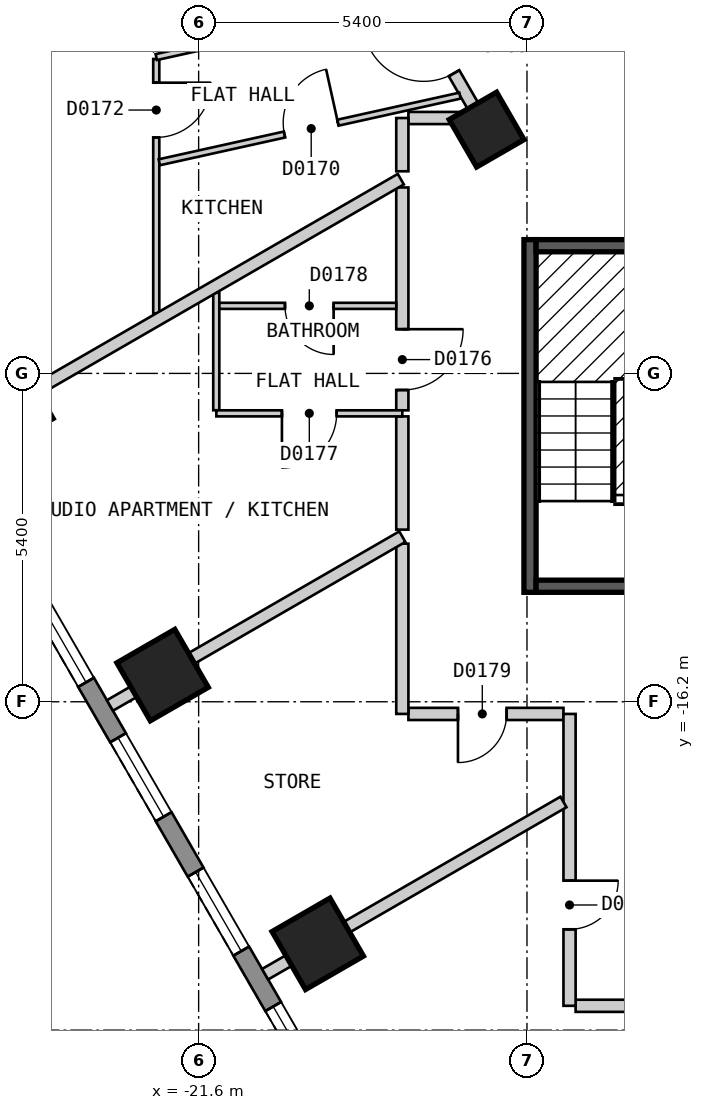
"""IFC4 building model, lengths in metres.
Left out: names, types, materials, properties, quantities, classifications, styles, units other than length and angle.
Written with IfcOpenShell. Run it as: python <this file> out.ifc"""

import sys

from ifc_helpers import new_model, si_unit, direction, frame, frame_2d, origin, origin_2d, place, context, subcontext, project, spatial, polyline, rectangle, outline, extrude, element, fill, save


model = new_model("IFC4")
c1 = context("Model", 3, precision=1e-05, world=origin(), true_north=direction((0.0, 1.0)))
c2 = subcontext(c1, "Body", "Model", "MODEL_VIEW")
j1 = project(units=[si_unit("LENGTHUNIT", "METRE"), si_unit("PLANEANGLEUNIT", "RADIAN")], contexts=[c1])
p1 = place(None, origin())
s1 = spatial("IfcSite", under=j1, at=p1, CompositionType="ELEMENT")
p2 = place(p1, origin())
s2 = spatial("IfcBuilding", under=s1, at=p2, CompositionType="ELEMENT")
p3 = place(p2, frame((0.0, 0.0, 29.4)))
s3 = spatial("IfcBuildingStorey", under=s2, at=p3, CompositionType="ELEMENT", Elevation=29.4)
for number, where, z_axis, x_axis in (
    (1, (-24.745, -11.341, 0.0), (0.0, 0.0, 1.0), (0.5, -0.866, 0.0)),
    (2, (-22.193, -15.761, 0.0), (0.0, 0.0, 1.0), (0.5, -0.866, 0.0)),
    (3, (-19.641, -20.181, 0.0), (0.0, 0.0, 1.0), (0.5, -0.866, 0.0)),
):
    element("IfcColumn", number, at=place(p3, frame(where, z_axis=z_axis, x_axis=x_axis)), inside=s3, PredefinedType="COLUMN", context=c2, shape_type="SweptSolid", body=[
        extrude(rectangle(XDim=1.1, YDim=1.1, at=origin_2d()), origin(), (0.0, 0.0, 1.0), 3.0),
    ])
p4 = place(p3, frame((-16.864, -6.791, 0.0), z_axis=(0.0, 0.0, 1.0), x_axis=(0.499984884929, -0.866034130299, 0.0)))
e4 = element("IfcColumn", 4, at=p4, inside=s3, PredefinedType="COLUMN", context=c2, shape_type="SweptSolid", body=[
    extrude(rectangle(XDim=0.9, YDim=0.9, at=origin_2d()), origin(), (0.0, 0.0, 1.0), 3.0),
])
p5 = place(p3, frame((-31.22, -2.425, 0.0), z_axis=(0.0, 0.0, 1.0), x_axis=(0.500001938803, -0.866024284413, 0.0)))
e5 = element("IfcWall", 5, at=p5, inside=s3, PredefinedType="SOLIDWALL", context=c2, shape_type="SweptSolid", body=[
    extrude(outline(polyline([(0.0, -0.15), (27.02, -0.15), (26.94, 0.15), (0.08, 0.15), (0.0, -0.15)])), origin(), (0.0, 0.0, 1.0), 2.7),
])
p6 = place(p5, frame((1.277, 0.0, 0.15)))
e6 = element("IfcOpeningElement", 6, at=p6, cuts=e5, PredefinedType="OPENING", context=c2, shape_type="SweptSolid", body=[
    extrude(rectangle(XDim=1.5, YDim=2.1, at=frame_2d((0.75, 1.05))), frame((0.0, 0.16, 0.0), z_axis=(0.0, -1.0, 0.0), x_axis=(1.0, 0.0, 0.0)), (0.0, 0.0, 1.0), 0.32),
])
p7 = place(p5, frame((3.829, 0.0, 0.15)))
e7 = element("IfcOpeningElement", 7, at=p7, cuts=e5, PredefinedType="OPENING", context=c2, shape_type="SweptSolid", body=[
    extrude(rectangle(XDim=1.5, YDim=2.1, at=frame_2d((0.75, 1.05))), frame((0.0, 0.16, 0.0), z_axis=(0.0, -1.0, 0.0), x_axis=(1.0, 0.0, 0.0)), (0.0, 0.0, 1.0), 0.32),
])
p8 = place(p5, frame((6.382, 0.0, 0.15)))
e8 = element("IfcOpeningElement", 8, at=p8, cuts=e5, PredefinedType="OPENING", context=c2, shape_type="SweptSolid", body=[
    extrude(rectangle(XDim=1.5, YDim=2.1, at=frame_2d((0.75, 1.05))), frame((0.0, 0.16, 0.0), z_axis=(0.0, -1.0, 0.0), x_axis=(1.0, 0.0, 0.0)), (0.0, 0.0, 1.0), 0.32),
])
p9 = place(p5, frame((8.933, 0.0, 0.15)))
e9 = element("IfcOpeningElement", 9, at=p9, cuts=e5, PredefinedType="OPENING", context=c2, shape_type="SweptSolid", body=[
    extrude(rectangle(XDim=1.5, YDim=2.1, at=frame_2d((0.75, 1.05))), frame((0.0, 0.16, 0.0), z_axis=(0.0, -1.0, 0.0), x_axis=(1.0, 0.0, 0.0)), (0.0, 0.0, 1.0), 0.32),
])
p10 = place(p5, frame((11.485, 0.0, 0.15)))
e10 = element("IfcOpeningElement", 10, at=p10, cuts=e5, PredefinedType="OPENING", context=c2, shape_type="SweptSolid", body=[
    extrude(rectangle(XDim=1.5, YDim=2.1, at=frame_2d((0.75, 1.05))), frame((0.0, 0.16, 0.0), z_axis=(0.0, -1.0, 0.0), x_axis=(1.0, 0.0, 0.0)), (0.0, 0.0, 1.0), 0.32),
])
p11 = place(p5, frame((14.037, 0.0, 0.15)))
e11 = element("IfcOpeningElement", 11, at=p11, cuts=e5, PredefinedType="OPENING", context=c2, shape_type="SweptSolid", body=[
    extrude(rectangle(XDim=1.5, YDim=2.1, at=frame_2d((0.75, 1.05))), frame((0.0, 0.16, 0.0), z_axis=(0.0, -1.0, 0.0), x_axis=(1.0, 0.0, 0.0)), (0.0, 0.0, 1.0), 0.32),
])
p12 = place(p5, frame((16.589, 0.0, 0.15)))
e12 = element("IfcOpeningElement", 12, at=p12, cuts=e5, PredefinedType="OPENING", context=c2, shape_type="SweptSolid", body=[
    extrude(rectangle(XDim=1.5, YDim=2.1, at=frame_2d((0.75, 1.05))), frame((0.0, 0.16, 0.0), z_axis=(0.0, -1.0, 0.0), x_axis=(1.0, 0.0, 0.0)), (0.0, 0.0, 1.0), 0.32),
])
p13 = place(p5, frame((19.141, 0.0, 0.15)))
e13 = element("IfcOpeningElement", 13, at=p13, cuts=e5, PredefinedType="OPENING", context=c2, shape_type="SweptSolid", body=[
    extrude(rectangle(XDim=1.5, YDim=2.1, at=frame_2d((0.75, 1.05))), frame((0.0, 0.16, 0.0), z_axis=(0.0, -1.0, 0.0), x_axis=(1.0, 0.0, 0.0)), (0.0, 0.0, 1.0), 0.32),
])
p14 = place(p5, frame((21.693, 0.0, 0.15)))
e14 = element("IfcOpeningElement", 14, at=p14, cuts=e5, PredefinedType="OPENING", context=c2, shape_type="SweptSolid", body=[
    extrude(rectangle(XDim=1.5, YDim=2.1, at=frame_2d((0.75, 1.05))), frame((0.0, 0.16, 0.0), z_axis=(0.0, -1.0, 0.0), x_axis=(1.0, 0.0, 0.0)), (0.0, 0.0, 1.0), 0.32),
])
p15 = place(p5, frame((24.244, 0.0, 0.15)))
e15 = element("IfcOpeningElement", 15, at=p15, cuts=e5, PredefinedType="OPENING", context=c2, shape_type="SweptSolid", body=[
    extrude(rectangle(XDim=1.5, YDim=2.1, at=frame_2d((0.75, 1.05))), frame((0.0, 0.16, 0.0), z_axis=(0.0, -1.0, 0.0), x_axis=(1.0, 0.0, 0.0)), (0.0, 0.0, 1.0), 0.32),
])
p16 = place(p3, frame((-20.727, -0.101, 0.0), z_axis=(0.0, 0.0, 1.0), x_axis=(0.500065652488, -0.865987495984, 0.0)))
e16 = element("IfcWall", 16, at=p16, inside=s3, PredefinedType="PARTITIONING", context=c2, shape_type="SweptSolid", body=[
    extrude(rectangle(XDim=7.389, YDim=0.2, at=frame_2d((3.695, 0.0))), origin(), (0.0, 0.0, 1.0), 2.7),
])
p17 = place(p16, frame((5.654, 0.0, 0.0)))
e17 = element("IfcOpeningElement", 17, at=p17, cuts=e16, PredefinedType="OPENING", context=c2, shape_type="SweptSolid", body=[
    extrude(rectangle(XDim=1.0, YDim=2.1, at=frame_2d((0.5, 1.05))), frame((0.0, 0.11, 0.0), z_axis=(0.0, -1.0, 0.0), x_axis=(1.0, 0.0, 0.0)), (0.0, 0.0, 1.0), 0.22),
])
p18 = place(p3, frame((-18.25, -11.507, 0.0), z_axis=(0.0, 0.0, 1.0), x_axis=(0.0, -1.0, 0.0)))
e18 = element("IfcWall", 18, at=p18, inside=s3, PredefinedType="PARTITIONING", context=c2, shape_type="SweptSolid", body=[
    extrude(rectangle(XDim=1.862, YDim=0.2, at=frame_2d((0.931, 0.0))), origin(), (0.0, 0.0, 1.0), 2.7),
])
p19 = place(p3, frame((-18.15, -6.6, 0.0), z_axis=(0.0, 0.0, 1.0), x_axis=(1.0, 0.0, 0.0)))
e19 = element("IfcWall", 19, at=p19, inside=s3, PredefinedType="PARTITIONING", context=c2, shape_type="SweptSolid", body=[
    extrude(rectangle(XDim=1.176, YDim=0.2, at=frame_2d((0.588, 0.0))), origin(), (0.0, 0.0, 1.0), 2.7),
])
p20 = place(p3, frame((-18.15, -16.4, 0.0), z_axis=(0.0, 0.0, 1.0), x_axis=(1.0, 0.0, 0.0)))
e20 = element("IfcWall", 20, at=p20, inside=s3, PredefinedType="PARTITIONING", context=c2, shape_type="SweptSolid", body=[
    extrude(rectangle(XDim=2.55, YDim=0.2, at=frame_2d((1.275, 0.0))), origin(), (0.0, 0.0, 1.0), 2.7),
])
p21 = place(p20, frame((0.815, 0.0, 0.0)))
e21 = element("IfcOpeningElement", 21, at=p21, cuts=e20, PredefinedType="OPENING", context=c2, shape_type="SweptSolid", body=[
    extrude(rectangle(XDim=0.8, YDim=2.1, at=frame_2d((0.4, 1.05))), frame((0.0, 0.11, 0.0), z_axis=(0.0, -1.0, 0.0), x_axis=(1.0, 0.0, 0.0)), (0.0, 0.0, 1.0), 0.22),
])
p22 = place(p3, frame((-15.4, -21.2, 0.0), z_axis=(0.0, 0.0, 1.0), x_axis=(1.0, 0.0, 0.0)))
e22 = element("IfcWall", 22, at=p22, inside=s3, PredefinedType="PARTITIONING", context=c2, shape_type="SweptSolid", body=[
    extrude(rectangle(XDim=30.799, YDim=0.2, at=frame_2d((15.399, 0.0))), origin(), (0.0, 0.0, 1.0), 2.7),
])
p23 = place(p22, frame((4.985, 0.0, 0.0)))
e23 = element("IfcOpeningElement", 23, at=p23, cuts=e22, PredefinedType="OPENING", context=c2, shape_type="SweptSolid", body=[
    extrude(rectangle(XDim=0.9, YDim=2.1, at=frame_2d((0.45, 1.05))), frame((0.0, 0.11, 0.0), z_axis=(0.0, -1.0, 0.0), x_axis=(1.0, 0.0, 0.0)), (0.0, 0.0, 1.0), 0.22),
])
p24 = place(p22, frame((14.901, 0.0, 0.0)))
e24 = element("IfcOpeningElement", 24, at=p24, cuts=e22, PredefinedType="OPENING", context=c2, shape_type="SweptSolid", body=[
    extrude(rectangle(XDim=1.0, YDim=2.1, at=frame_2d((0.5, 1.05))), frame((0.0, 0.11, 0.0), z_axis=(0.0, -1.0, 0.0), x_axis=(1.0, 0.0, 0.0)), (0.0, 0.0, 1.0), 0.22),
])
p25 = place(p22, frame((20.005, 0.0, 0.0)))
e25 = element("IfcOpeningElement", 25, at=p25, cuts=e22, PredefinedType="OPENING", context=c2, shape_type="SweptSolid", body=[
    extrude(rectangle(XDim=1.0, YDim=2.1, at=frame_2d((0.5, 1.05))), frame((0.0, 0.11, 0.0), z_axis=(0.0, -1.0, 0.0), x_axis=(1.0, 0.0, 0.0)), (0.0, 0.0, 1.0), 0.22),
])
p26 = place(p22, frame((24.916, 0.0, 0.0)))
e26 = element("IfcOpeningElement", 26, at=p26, cuts=e22, PredefinedType="OPENING", context=c2, shape_type="SweptSolid", body=[
    extrude(rectangle(XDim=0.9, YDim=2.1, at=frame_2d((0.45, 1.05))), frame((0.0, 0.11, 0.0), z_axis=(0.0, -1.0, 0.0), x_axis=(1.0, 0.0, 0.0)), (0.0, 0.0, 1.0), 0.22),
])
p27 = place(p3, frame((-15.5, -21.2, 0.0), z_axis=(0.0, 0.0, 1.0), x_axis=(0.0, 1.0, 0.0)))
e27 = element("IfcWall", 27, at=p27, inside=s3, PredefinedType="PARTITIONING", context=c2, shape_type="SweptSolid", body=[
    extrude(rectangle(XDim=4.8, YDim=0.2, at=frame_2d((2.4, 0.0))), origin(), (0.0, 0.0, 1.0), 2.7),
])
p28 = place(p27, frame((1.258, 0.0, 0.0)))
e28 = element("IfcOpeningElement", 28, at=p28, cuts=e27, PredefinedType="OPENING", context=c2, shape_type="SweptSolid", body=[
    extrude(rectangle(XDim=0.8, YDim=2.1, at=frame_2d((0.4, 1.05))), frame((0.0, 0.11, 0.0), z_axis=(0.0, -1.0, 0.0), x_axis=(1.0, 0.0, 0.0)), (0.0, 0.0, 1.0), 0.22),
])
p29 = place(p3, frame((-18.25, -16.4, 0.0), z_axis=(0.0, 0.0, 1.0), x_axis=(0.0, 1.0, 0.0)))
e29 = element("IfcWall", 29, at=p29, inside=s3, PredefinedType="PARTITIONING", context=c2, shape_type="SweptSolid", body=[
    extrude(rectangle(XDim=2.8, YDim=0.2, at=frame_2d((1.4, 0.0))), origin(), (0.0, 0.0, 1.0), 2.7),
])
p30 = place(p3, frame((-18.25, -11.407, 0.0), z_axis=(0.0, 0.0, 1.0), x_axis=(0.0, 1.0, 0.0)))
e30 = element("IfcWall", 30, at=p30, inside=s3, PredefinedType="PARTITIONING", context=c2, shape_type="SweptSolid", body=[
    extrude(rectangle(XDim=3.665, YDim=0.2, at=frame_2d((1.833, 0.0))), origin(), (0.0, 0.0, 1.0), 2.7),
])
p31 = place(p30, frame((0.334, 0.0, 0.0)))
e31 = element("IfcOpeningElement", 31, at=p31, cuts=e30, PredefinedType="OPENING", context=c2, shape_type="SweptSolid", body=[
    extrude(rectangle(XDim=1.0, YDim=2.1, at=frame_2d((0.5, 1.05))), frame((0.0, 0.11, 0.0), z_axis=(0.0, -1.0, 0.0), x_axis=(1.0, 0.0, 0.0)), (0.0, 0.0, 1.0), 0.22),
])
p32 = place(p3, frame((-18.25, -7.476, 0.0), z_axis=(0.0, 0.0, 1.0), x_axis=(0.0, 1.0, 0.0)))
e32 = element("IfcWall", 32, at=p32, inside=s3, PredefinedType="PARTITIONING", context=c2, shape_type="SweptSolid", body=[
    extrude(rectangle(XDim=0.876, YDim=0.2, at=frame_2d((0.438, 0.0))), origin(), (0.0, 0.0, 1.0), 2.7),
])
p33 = place(p3, frame((-21.31, -9.474, 0.0), z_axis=(0.0, 0.0, 1.0), x_axis=(0.0, -1.0, 0.0)))
e33 = element("IfcWall", 33, at=p33, inside=s3, PredefinedType="PARTITIONING", context=c2, shape_type="SweptSolid", body=[
    extrude(rectangle(XDim=1.932, YDim=0.1, at=frame_2d((0.966, 0.0))), origin(), (0.0, 0.0, 1.0), 2.7),
])
p34 = place(p3, frame((-21.26, -9.689, 0.0), z_axis=(0.0, 0.0, 1.0), x_axis=(1.0, 0.0, 0.0)))
e34 = element("IfcWall", 34, at=p34, inside=s3, PredefinedType="PARTITIONING", context=c2, shape_type="SweptSolid", body=[
    extrude(rectangle(XDim=2.91, YDim=0.1, at=frame_2d((1.455, 0.0))), origin(), (0.0, 0.0, 1.0), 2.7),
])
p35 = place(p34, frame((1.08, 0.0, 0.0)))
e35 = element("IfcOpeningElement", 35, at=p35, cuts=e34, PredefinedType="OPENING", context=c2, shape_type="SweptSolid", body=[
    extrude(rectangle(XDim=0.8, YDim=2.1, at=frame_2d((0.4, 1.05))), frame((0.0, 0.06, 0.0), z_axis=(0.0, -1.0, 0.0), x_axis=(1.0, 0.0, 0.0)), (0.0, 0.0, 1.0), 0.12),
])
p36 = place(p3, frame((-21.309, -11.457, 0.0), z_axis=(0.0, 0.0, 1.0), x_axis=(1.0, 0.0, 0.0)))
e36 = element("IfcWall", 36, at=p36, inside=s3, PredefinedType="PARTITIONING", context=c2, shape_type="SweptSolid", body=[
    extrude(rectangle(XDim=3.059, YDim=0.1, at=frame_2d((1.53, 0.0))), origin(), (0.0, 0.0, 1.0), 2.7),
])
p37 = place(p36, frame((1.079, 0.0, 0.0)))
e37 = element("IfcOpeningElement", 37, at=p37, cuts=e36, PredefinedType="OPENING", context=c2, shape_type="SweptSolid", body=[
    extrude(rectangle(XDim=0.9, YDim=2.1, at=frame_2d((0.45, 1.05))), frame((0.0, 0.06, 0.0), z_axis=(0.0, -1.0, 0.0), x_axis=(1.0, 0.0, 0.0)), (0.0, 0.0, 1.0), 0.12),
])
p38 = place(p3, frame((-22.297, -9.813, 0.0), z_axis=(0.0, 0.0, 1.0), x_axis=(0.0, 1.0, 0.0)))
e38 = element("IfcWall", 38, at=p38, inside=s3, PredefinedType="PARTITIONING", context=c2, shape_type="SweptSolid", body=[
    extrude(rectangle(XDim=4.184, YDim=0.1, at=frame_2d((2.092, 0.0))), origin(), (0.0, 0.0, 1.0), 2.7),
])
p39 = place(p38, frame((2.894, 0.0, 0.0)))
e39 = element("IfcOpeningElement", 39, at=p39, cuts=e38, PredefinedType="OPENING", context=c2, shape_type="SweptSolid", body=[
    extrude(rectangle(XDim=0.9, YDim=2.1, at=frame_2d((0.45, 1.05))), frame((0.0, 0.06, 0.0), z_axis=(0.0, -1.0, 0.0), x_axis=(1.0, 0.0, 0.0)), (0.0, 0.0, 1.0), 0.12),
])
p40 = place(p3, frame((-22.297, -5.598, 0.0), z_axis=(0.0, 0.0, 1.0), x_axis=(0.976341239907, 0.216235481033, 0.0)))
e40 = element("IfcWall", 40, at=p40, inside=s3, PredefinedType="PARTITIONING", context=c2, shape_type="SweptSolid", body=[
    extrude(rectangle(XDim=4.203, YDim=0.1, at=frame_2d((2.102, 0.0))), origin(), (0.0, 0.0, 1.0), 2.7),
])
p41 = place(p40, frame((1.754, 0.0, 0.0)))
e41 = element("IfcOpeningElement", 41, at=p41, cuts=e40, PredefinedType="OPENING", context=c2, shape_type="SweptSolid", body=[
    extrude(rectangle(XDim=0.8, YDim=2.1, at=frame_2d((0.4, 1.05))), frame((0.0, 0.06, 0.0), z_axis=(0.0, -1.0, 0.0), x_axis=(1.0, 0.0, 0.0)), (0.0, 0.0, 1.0), 0.12),
])
p42 = place(p3, frame((-22.247, -7.328, 0.0), z_axis=(0.0, 0.0, 1.0), x_axis=(0.976310522972, 0.216374126765, 0.0)))
e42 = element("IfcWall", 42, at=p42, inside=s3, PredefinedType="PARTITIONING", context=c2, shape_type="SweptSolid", body=[
    extrude(rectangle(XDim=5.065, YDim=0.1, at=frame_2d((2.532, 0.0))), origin(), (0.0, 0.0, 1.0), 2.7),
])
p43 = place(p42, frame((2.109, 0.0, 0.0)))
e43 = element("IfcOpeningElement", 43, at=p43, cuts=e42, PredefinedType="OPENING", context=c2, shape_type="SweptSolid", body=[
    extrude(rectangle(XDim=0.9, YDim=2.1, at=frame_2d((0.45, 1.05))), frame((0.0, 0.06, 0.0), z_axis=(0.0, -1.0, 0.0), x_axis=(1.0, 0.0, 0.0)), (0.0, 0.0, 1.0), 0.12),
])
p44 = place(p3, frame((-28.163, -7.42, 0.0), z_axis=(0.0, 0.0, 1.0), x_axis=(0.866065245018, 0.499930986609, 0.0)))
e44 = element("IfcWall", 44, at=p44, inside=s3, PredefinedType="PARTITIONING", context=c2, shape_type="SweptSolid", body=[
    extrude(rectangle(XDim=10.0, YDim=0.1, at=frame_2d((5.0, 0.0))), origin(), (0.0, 0.0, 1.0), 2.7),
])
p45 = place(p44, frame((2.576, 0.0, 0.0)))
e45 = element("IfcOpeningElement", 45, at=p45, cuts=e44, PredefinedType="OPENING", context=c2, shape_type="SweptSolid", body=[
    extrude(rectangle(XDim=0.9, YDim=2.1, at=frame_2d((0.45, 1.05))), frame((0.0, 0.06, 0.0), z_axis=(0.0, -1.0, 0.0), x_axis=(1.0, 0.0, 0.0)), (0.0, 0.0, 1.0), 0.12),
])
p46 = place(p3, frame((-20.507, -20.681, 0.0), z_axis=(0.0, 0.0, 1.0), x_axis=(0.866028446103, 0.499994730513, 0.0)))
e46 = element("IfcWall", 46, at=p46, inside=s3, PredefinedType="PARTITIONING", context=c2, shape_type="SweptSolid", body=[
    extrude(rectangle(XDim=5.666, YDim=0.2, at=frame_2d((2.833, 0.0))), origin(), (0.0, 0.0, 1.0), 2.7),
])
p47 = place(p3, frame((-23.059, -16.261, 0.0), z_axis=(0.0, 0.0, 1.0), x_axis=(0.866075767886, 0.499912756669, 0.0)))
e47 = element("IfcWall", 47, at=p47, inside=s3, PredefinedType="PARTITIONING", context=c2, shape_type="SweptSolid", body=[
    extrude(rectangle(XDim=5.553, YDim=0.2, at=frame_2d((2.776, 0.0))), origin(), (0.0, 0.0, 1.0), 2.7),
])
p48 = place(p3, frame((-25.61, -11.841, 0.0), z_axis=(0.0, 0.0, 1.0), x_axis=(0.866019023803, 0.500011050288, 0.0)))
e48 = element("IfcWall", 48, at=p48, inside=s3, PredefinedType="PARTITIONING", context=c2, shape_type="SweptSolid", body=[
    extrude(rectangle(XDim=8.47, YDim=0.2, at=frame_2d((4.235, 0.0))), origin(), (0.0, 0.0, 1.0), 2.7),
])
p49 = place(p3, frame((-16.15, -14.4, 0.0), z_axis=(0.0, 0.0, 1.0), x_axis=(0.0, 1.0, 0.0)))
e49 = element("IfcWall", 49, at=p49, inside=s3, PredefinedType="SOLIDWALL", context=c2, shape_type="SweptSolid", body=[
    extrude(rectangle(XDim=5.8, YDim=0.2, at=frame_2d((2.9, 0.0))), origin(), (0.0, 0.0, 1.0), 2.7),
])
for number, where, z_axis, x_axis in (
    (50, (-16.05, -14.3, 0.0), (0.0, 0.0, 1.0), (1.0, 0.0, 0.0)),
    (51, (-16.05, -8.7, 0.0), (0.0, 0.0, 1.0), (1.0, 0.0, 0.0)),
):
    element("IfcWall", number, at=place(p3, frame(where, z_axis=z_axis, x_axis=x_axis)), inside=s3, PredefinedType="SOLIDWALL", context=c2, shape_type="SweptSolid", body=[
        extrude(rectangle(XDim=2.75, YDim=0.2, at=frame_2d((1.375, 0.0))), origin(), (0.0, 0.0, 1.0), 2.7),
    ])
p50 = place(p11, origin())
e52 = element("IfcWindow", 52, at=p50, inside=s3, PartitioningType="SINGLE_PANEL", PredefinedType="WINDOW", context=c2, shape_type="SweptSolid", body=[
    extrude(rectangle(XDim=1.5, YDim=2.1, at=frame_2d((0.75, 1.05))), frame((0.0, 0.03, 0.0), z_axis=(0.0, -1.0, 0.0), x_axis=(1.0, 0.0, 0.0)), (0.0, 0.0, 1.0), 0.06),
])
fill(e11, e52)
p51 = place(p12, origin())
e53 = element("IfcWindow", 53, at=p51, inside=s3, PartitioningType="SINGLE_PANEL", PredefinedType="WINDOW", context=c2, shape_type="SweptSolid", body=[
    extrude(rectangle(XDim=1.5, YDim=2.1, at=frame_2d((0.75, 1.05))), frame((0.0, 0.03, 0.0), z_axis=(0.0, -1.0, 0.0), x_axis=(1.0, 0.0, 0.0)), (0.0, 0.0, 1.0), 0.06),
])
fill(e12, e53)
p52 = place(p13, origin())
e54 = element("IfcWindow", 54, at=p52, inside=s3, PartitioningType="SINGLE_PANEL", PredefinedType="WINDOW", context=c2, shape_type="SweptSolid", body=[
    extrude(rectangle(XDim=1.5, YDim=2.1, at=frame_2d((0.75, 1.05))), frame((0.0, 0.03, 0.0), z_axis=(0.0, -1.0, 0.0), x_axis=(1.0, 0.0, 0.0)), (0.0, 0.0, 1.0), 0.06),
])
fill(e13, e54)
p53 = place(p14, origin())
e55 = element("IfcWindow", 55, at=p53, inside=s3, PartitioningType="SINGLE_PANEL", PredefinedType="WINDOW", context=c2, shape_type="SweptSolid", body=[
    extrude(rectangle(XDim=1.5, YDim=2.1, at=frame_2d((0.75, 1.05))), frame((0.0, 0.03, 0.0), z_axis=(0.0, -1.0, 0.0), x_axis=(1.0, 0.0, 0.0)), (0.0, 0.0, 1.0), 0.06),
])
fill(e14, e55)
p54 = place(p17, origin())
e56 = element("IfcDoor", 56, at=p54, inside=s3, OperationType="SINGLE_SWING_LEFT", PredefinedType="DOOR", context=c2, shape_type="SweptSolid", body=[
    extrude(rectangle(XDim=1.0, YDim=2.1, at=frame_2d((0.5, 1.05))), frame((0.0, 0.025, 0.0), z_axis=(0.0, -1.0, 0.0), x_axis=(1.0, 0.0, 0.0)), (0.0, 0.0, 1.0), 0.05),
])
fill(e17, e56)
p55 = place(p43, origin())
e57 = element("IfcDoor", 57, at=p55, inside=s3, OperationType="SINGLE_SWING_RIGHT", PredefinedType="DOOR", context=c2, shape_type="SweptSolid", body=[
    extrude(rectangle(XDim=0.9, YDim=2.1, at=frame_2d((0.45, 1.05))), frame((0.0, 0.025, 0.0), z_axis=(0.0, -1.0, 0.0), x_axis=(1.0, 0.0, 0.0)), (0.0, 0.0, 1.0), 0.05),
])
fill(e43, e57)
p56 = place(p39, origin())
e58 = element("IfcDoor", 58, at=p56, inside=s3, OperationType="SINGLE_SWING_RIGHT", PredefinedType="DOOR", context=c2, shape_type="SweptSolid", body=[
    extrude(rectangle(XDim=0.9, YDim=2.1, at=frame_2d((0.45, 1.05))), frame((0.0, 0.025, 0.0), z_axis=(0.0, -1.0, 0.0), x_axis=(1.0, 0.0, 0.0)), (0.0, 0.0, 1.0), 0.05),
])
fill(e39, e58)
p57 = place(p31, origin())
e59 = element("IfcDoor", 59, at=p57, inside=s3, OperationType="SINGLE_SWING_RIGHT", PredefinedType="DOOR", context=c2, shape_type="SweptSolid", body=[
    extrude(rectangle(XDim=1.0, YDim=2.1, at=frame_2d((0.5, 1.05))), frame((0.0, 0.025, 0.0), z_axis=(0.0, -1.0, 0.0), x_axis=(1.0, 0.0, 0.0)), (0.0, 0.0, 1.0), 0.05),
])
fill(e31, e59)
p58 = place(p37, origin())
e60 = element("IfcDoor", 60, at=p58, inside=s3, OperationType="SINGLE_SWING_LEFT", PredefinedType="DOOR", context=c2, shape_type="SweptSolid", body=[
    extrude(rectangle(XDim=0.9, YDim=2.1, at=frame_2d((0.45, 1.05))), frame((0.0, 0.025, 0.0), z_axis=(0.0, -1.0, 0.0), x_axis=(1.0, 0.0, 0.0)), (0.0, 0.0, 1.0), 0.05),
])
fill(e37, e60)
p59 = place(p35, origin())
e61 = element("IfcDoor", 61, at=p59, inside=s3, OperationType="SINGLE_SWING_RIGHT", PredefinedType="DOOR", context=c2, shape_type="SweptSolid", body=[
    extrude(rectangle(XDim=0.8, YDim=2.1, at=frame_2d((0.4, 1.05))), frame((0.0, 0.025, 0.0), z_axis=(0.0, -1.0, 0.0), x_axis=(1.0, 0.0, 0.0)), (0.0, 0.0, 1.0), 0.05),
])
fill(e35, e61)
p60 = place(p21, origin())
e62 = element("IfcDoor", 62, at=p60, inside=s3, OperationType="SINGLE_SWING_LEFT", PredefinedType="DOOR", context=c2, shape_type="SweptSolid", body=[
    extrude(rectangle(XDim=0.8, YDim=2.1, at=frame_2d((0.4, 1.05))), frame((0.0, 0.025, 0.0), z_axis=(0.0, -1.0, 0.0), x_axis=(1.0, 0.0, 0.0)), (0.0, 0.0, 1.0), 0.05),
])
fill(e21, e62)
p61 = place(p28, origin())
e63 = element("IfcDoor", 63, at=p61, inside=s3, OperationType="SINGLE_SWING_RIGHT", PredefinedType="DOOR", context=c2, shape_type="SweptSolid", body=[
    extrude(rectangle(XDim=0.8, YDim=2.1, at=frame_2d((0.4, 1.05))), frame((0.0, 0.025, 0.0), z_axis=(0.0, -1.0, 0.0), x_axis=(1.0, 0.0, 0.0)), (0.0, 0.0, 1.0), 0.05),
])
fill(e28, e63)
save(model, sys.argv[1])
